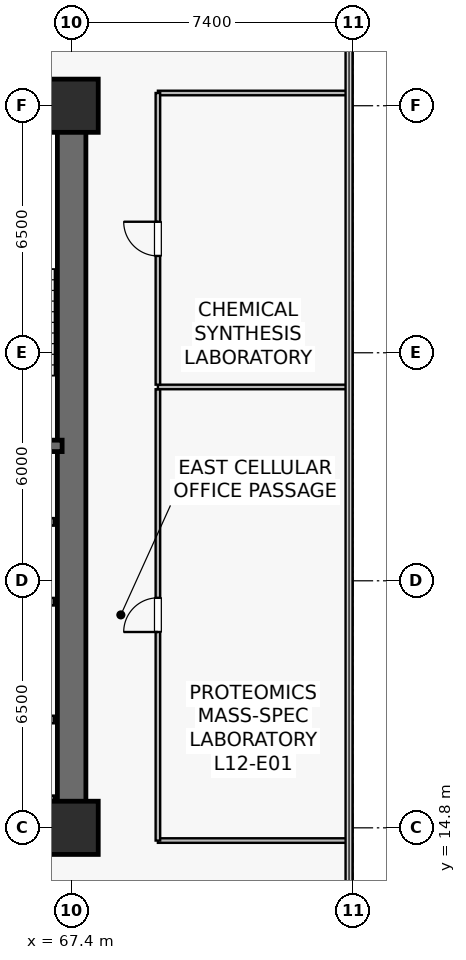
"""IFC4 building model, lengths in metres.
Left out: names, types, materials, properties, quantities, classifications, styles, units other than length and angle.
Written with IfcOpenShell. Run it as: python <this file> out.ifc"""

import sys

from ifc_helpers import new_model, si_unit, direction, frame, frame_2d, origin, origin_2d, place, context, subcontext, project, spatial, rectangle, extrude, source, transform, mapped, element, fill, save


model = new_model("IFC4")
c1 = context("Model", 3, precision=1e-05, world=origin(), true_north=direction((0.0, 1.0)))
c2 = subcontext(c1, "Body", "Model", "MODEL_VIEW")
j1 = project(units=[si_unit("LENGTHUNIT", "METRE"), si_unit("PLANEANGLEUNIT", "RADIAN")], contexts=[c1])
p1 = place(None, origin())
s1 = spatial("IfcSite", under=j1, at=p1, CompositionType="ELEMENT")
p2 = place(p1, origin())
s2 = spatial("IfcBuilding", under=s1, at=p2, CompositionType="ELEMENT")
p3 = place(p2, frame((0.0, 0.0, 49.8)))
s3 = spatial("IfcBuildingStorey", under=s2, at=p3, CompositionType="ELEMENT", Elevation=49.8)
p4 = place(p3, frame((52.225, 14.8, 0.0), z_axis=(0.0, 0.0, 1.0), x_axis=(1.0, 0.0, 0.0)))
e1 = element("IfcWall", 1, at=p4, inside=s3, PredefinedType="SHEAR", context=c2, shape_type="SweptSolid", body=[
    extrude(rectangle(XDim=15.55, YDim=0.75, at=frame_2d((7.775, 0.0))), origin(), (0.0, 0.0, 1.0), 3.78),
])
p5 = place(p3, frame((52.225, 33.8, 0.0), z_axis=(0.0, 0.0, 1.0), x_axis=(1.0, 0.0, 0.0)))
e2 = element("IfcWall", 2, at=p5, inside=s3, PredefinedType="SHEAR", context=c2, shape_type="SweptSolid", body=[
    extrude(rectangle(XDim=15.55, YDim=0.75, at=frame_2d((7.775, 0.0))), origin(), (0.0, 0.0, 1.0), 3.78),
])
p6 = place(p5, frame((9.3, 0.0, 0.0)))
e3 = element("IfcOpeningElement", 3, at=p6, cuts=e2, PredefinedType="OPENING", context=c2, shape_type="SweptSolid", body=[
    extrude(rectangle(XDim=0.95, YDim=2.15, at=frame_2d((0.475, 1.075))), frame((0.0, 0.385, 0.0), z_axis=(0.0, -1.0, 0.0), x_axis=(1.0, 0.0, 0.0)), (0.0, 0.0, 1.0), 0.77),
])
p7 = place(p5, frame((6.785, 0.0, 0.0)))
e4 = element("IfcOpeningElement", 4, at=p7, cuts=e2, PredefinedType="OPENING", context=c2, shape_type="SweptSolid", body=[
    extrude(rectangle(XDim=0.95, YDim=2.15, at=frame_2d((0.475, 1.075))), frame((0.0, 0.385, 0.0), z_axis=(0.0, -1.0, 0.0), x_axis=(1.0, 0.0, 0.0)), (0.0, 0.0, 1.0), 0.77),
])
p8 = place(p5, frame((4.235, 0.0, 0.0)))
e5 = element("IfcOpeningElement", 5, at=p8, cuts=e2, PredefinedType="OPENING", context=c2, shape_type="SweptSolid", body=[
    extrude(rectangle(XDim=0.95, YDim=2.15, at=frame_2d((0.475, 1.075))), frame((0.0, 0.385, 0.0), z_axis=(0.0, -1.0, 0.0), x_axis=(1.0, 0.0, 0.0)), (0.0, 0.0, 1.0), 0.77),
])
p9 = place(p5, frame((1.685, 0.0, 0.0)))
e6 = element("IfcOpeningElement", 6, at=p9, cuts=e2, PredefinedType="OPENING", context=c2, shape_type="SweptSolid", body=[
    extrude(rectangle(XDim=0.95, YDim=2.15, at=frame_2d((0.475, 1.075))), frame((0.0, 0.385, 0.0), z_axis=(0.0, -1.0, 0.0), x_axis=(1.0, 0.0, 0.0)), (0.0, 0.0, 1.0), 0.77),
])
p10 = place(p3, frame((67.4, 15.175, 0.0), z_axis=(0.0, 0.0, 1.0), x_axis=(0.0, 1.0, 0.0)))
e7 = element("IfcWall", 7, at=p10, inside=s3, PredefinedType="SHEAR", context=c2, shape_type="SweptSolid", body=[
    extrude(rectangle(XDim=18.25, YDim=0.75, at=frame_2d((9.125, 0.0))), origin(), (0.0, 0.0, 1.0), 3.78),
])
p11 = place(p3, frame((63.35, 24.85, 0.0), z_axis=(0.0, 0.0, 1.0), x_axis=(1.0, 0.0, 0.0)))
e8 = element("IfcWall", 8, at=p11, inside=s3, PredefinedType="SHEAR", context=c2, shape_type="SweptSolid", body=[
    extrude(rectangle(XDim=3.8, YDim=0.3, at=frame_2d((1.9, 0.0))), origin(), (0.0, 0.0, 1.0), 3.78),
])
p12 = place(p3, frame((63.35, 33.4, 0.0), z_axis=(0.0, 0.0, 1.0), x_axis=(1.0, 0.0, 0.0)))
e9 = element("IfcWall", 9, at=p12, inside=s3, PredefinedType="SOLIDWALL", context=c2, shape_type="SweptSolid", body=[
    extrude(rectangle(XDim=3.72, YDim=0.12, at=frame_2d((1.86, 0.0))), origin(), (0.0, 0.0, 1.0), 3.78),
])
m1 = source(origin(), c2, "Body", "SweptSolid", [
    extrude(rectangle(XDim=1.4, YDim=1.4, at=origin_2d()), origin(), (0.0, 0.0, 1.0), 4.1),
])
for number, where, z_axis, x_axis in (
    (10, (67.4, 14.8, 0.0), (0.0, 0.0, 1.0), (1.0, 0.0, 0.0)),
    (11, (67.4, 33.8, 0.0), (0.0, 0.0, 1.0), (1.0, 0.0, 0.0)),
):
    element("IfcColumn", number, at=place(p3, frame(where, z_axis=z_axis, x_axis=x_axis)), inside=s3, PredefinedType="COLUMN", context=c2, shape_type="MappedRepresentation", body=[
        mapped(m1, transform((0.0, 0.0, 0.0), scale=1.0)),
    ])
p13 = place(p3, frame((64.67, 17.65, 0.0), z_axis=(0.0, 0.0, 1.0), x_axis=(1.0, 0.0, 0.0)))
e12 = element("IfcWall", 12, at=p13, inside=s3, PredefinedType="SOLIDWALL", context=c2, shape_type="SweptSolid", body=[
    extrude(rectangle(XDim=2.26, YDim=0.2, at=frame_2d((1.13, 0.0))), origin(), (0.0, 0.0, 1.0), 3.78),
])
p14 = place(p13, frame((0.58, 0.0, 0.0)))
e13 = element("IfcOpeningElement", 13, at=p14, cuts=e12, PredefinedType="OPENING", context=c2, shape_type="SweptSolid", body=[
    extrude(rectangle(XDim=1.1, YDim=2.22, at=frame_2d((0.55, 1.11))), frame((0.0, 0.11, 0.0), z_axis=(0.0, -1.0, 0.0), x_axis=(1.0, 0.0, 0.0)), (0.0, 0.0, 1.0), 0.22),
])
for number, where, z_axis, x_axis in (
    (14, (64.67, 15.55, 0.0), (0.0, 0.0, 1.0), (1.0, 0.0, 0.0)),
    (15, (64.67, 20.75, 0.0), (0.0, 0.0, 1.0), (1.0, 0.0, 0.0)),
    (16, (64.67, 22.85, 0.0), (0.0, 0.0, 1.0), (1.0, 0.0, 0.0)),
):
    element("IfcWall", number, at=place(p3, frame(where, z_axis=z_axis, x_axis=x_axis)), inside=s3, PredefinedType="SOLIDWALL", context=c2, shape_type="SweptSolid", body=[
        extrude(rectangle(XDim=2.26, YDim=0.2, at=frame_2d((1.13, 0.0))), origin(), (0.0, 0.0, 1.0), 3.78),
    ])
for number, where, z_axis, x_axis in (
    (17, (69.67, 14.465, 0.0), (0.0, 0.0, 1.0), (1.0, 0.0, 0.0)),
    (18, (69.67, 34.135, 0.0), (0.0, 0.0, 1.0), (1.0, 0.0, 0.0)),
):
    element("IfcWall", number, at=place(p3, frame(where, z_axis=z_axis, x_axis=x_axis)), inside=s3, PredefinedType="PARTITIONING", context=c2, shape_type="SweptSolid", body=[
        extrude(rectangle(XDim=5.02, YDim=0.12, at=frame_2d((2.51, 0.0))), origin(), (0.0, 0.0, 1.0), 3.78),
    ])
p15 = place(p3, frame((69.67, 14.465, 0.0), z_axis=(0.0, 0.0, 1.0), x_axis=(0.0, 1.0, 0.0)))
e19 = element("IfcWall", 19, at=p15, inside=s3, PredefinedType="PARTITIONING", context=c2, shape_type="SweptSolid", body=[
    extrude(rectangle(XDim=11.875, YDim=0.12, at=frame_2d((5.938, 0.0))), origin(), (0.0, 0.0, 1.0), 3.78),
])
p16 = place(p15, frame((5.488, 0.0, 0.0)))
e20 = element("IfcOpeningElement", 20, at=p16, cuts=e19, PredefinedType="OPENING", context=c2, shape_type="SweptSolid", body=[
    extrude(rectangle(XDim=0.9, YDim=2.1, at=frame_2d((0.45, 1.05))), frame((0.0, 0.07, 0.0), z_axis=(0.0, -1.0, 0.0), x_axis=(1.0, 0.0, 0.0)), (0.0, 0.0, 1.0), 0.14),
])
p17 = place(p3, frame((69.67, 26.4, 0.0), z_axis=(0.0, 0.0, 1.0), x_axis=(1.0, 0.0, 0.0)))
e21 = element("IfcWall", 21, at=p17, inside=s3, PredefinedType="PARTITIONING", context=c2, shape_type="SweptSolid", body=[
    extrude(rectangle(XDim=5.02, YDim=0.12, at=frame_2d((2.51, 0.0))), origin(), (0.0, 0.0, 1.0), 3.78),
])
p18 = place(p3, frame((69.67, 26.46, 0.0), z_axis=(0.0, 0.0, 1.0), x_axis=(0.0, 1.0, 0.0)))
e22 = element("IfcWall", 22, at=p18, inside=s3, PredefinedType="PARTITIONING", context=c2, shape_type="SweptSolid", body=[
    extrude(rectangle(XDim=7.675, YDim=0.12, at=frame_2d((3.837, 0.0))), origin(), (0.0, 0.0, 1.0), 3.78),
])
p19 = place(p18, frame((3.387, 0.0, 0.0)))
e23 = element("IfcOpeningElement", 23, at=p19, cuts=e22, PredefinedType="OPENING", context=c2, shape_type="SweptSolid", body=[
    extrude(rectangle(XDim=0.9, YDim=2.1, at=frame_2d((0.45, 1.05))), frame((0.0, 0.07, 0.0), z_axis=(0.0, -1.0, 0.0), x_axis=(1.0, 0.0, 0.0)), (0.0, 0.0, 1.0), 0.14),
])
m2 = source(origin(), c2, "Body", "SweptSolid", [
    extrude(rectangle(XDim=0.9, YDim=2.1, at=frame_2d((0.45, 1.05))), frame((0.0, 0.025, 0.0), z_axis=(0.0, -1.0, 0.0), x_axis=(1.0, 0.0, 0.0)), (0.0, 0.0, 1.0), 0.05),
])
p20 = place(p16, origin())
e24 = element("IfcDoor", 24, at=p20, inside=s3, OperationType="SINGLE_SWING_LEFT", PredefinedType="DOOR", context=c2, shape_type="MappedRepresentation", body=[
    mapped(m2, transform((0.0, 0.0, 0.0), scale=1.0)),
])
fill(e20, e24)
p21 = place(p19, origin())
e25 = element("IfcDoor", 25, at=p21, inside=s3, OperationType="SINGLE_SWING_RIGHT", PredefinedType="DOOR", context=c2, shape_type="MappedRepresentation", body=[
    mapped(m2, transform((0.0, 0.0, 0.0), scale=1.0)),
])
fill(e23, e25)
save(model, sys.argv[1])
